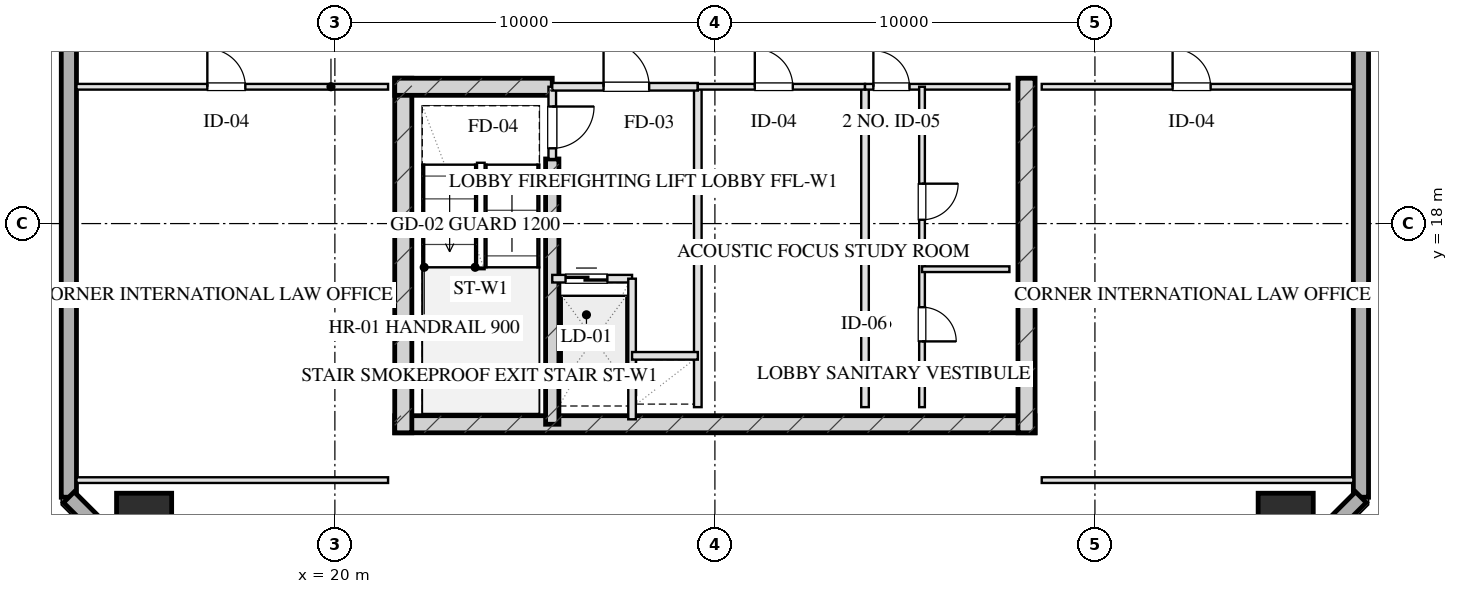
"""IFC4 building model, lengths in metres.
Left out: names, types, materials, properties, quantities, classifications, styles, units other than length and angle.
Written with IfcOpenShell. Run it as: python <this file> out.ifc"""

import sys

from ifc_helpers import new_model, si_unit, direction, frame, frame_2d, origin, origin_2d, place, context, subcontext, project, spatial, rectangle, hollow_rectangle, extrude, element, fill, save


model = new_model("IFC4")
c1 = context("Model", 3, precision=1e-05, world=origin(), true_north=direction((0.0, 1.0)))
c2 = subcontext(c1, "Body", "Model", "MODEL_VIEW")
j1 = project(units=[si_unit("LENGTHUNIT", "METRE"), si_unit("PLANEANGLEUNIT", "RADIAN")], contexts=[c1])
p1 = place(None, origin())
s1 = spatial("IfcSite", under=j1, at=p1, CompositionType="ELEMENT")
p2 = place(p1, origin())
s2 = spatial("IfcBuilding", under=s1, at=p2, CompositionType="ELEMENT")
p3 = place(p2, frame((0.0, 0.0, 188.6)))
s3 = spatial("IfcBuildingStorey", under=s2, at=p3, CompositionType="ELEMENT", Elevation=188.6)
p4 = place(p3, frame((21.575, 12.72, 0.0), z_axis=(0.0, 0.0, 1.0), x_axis=(1.0, 0.0, 0.0)))
e1 = element("IfcWall", 1, at=p4, inside=s3, PredefinedType="SHEAR", context=c2, shape_type="SweptSolid", body=[
    extrude(rectangle(XDim=16.85, YDim=0.45, at=frame_2d((8.425, 0.0))), origin(), (0.0, 0.0, 1.0), 3.45),
])
for number, where, z_axis, x_axis in (
    (2, (21.8, 21.825, 0.0), (0.0, 0.0, 1.0), (0.0, -1.0, 0.0)),
    (3, (38.2, 21.825, 0.0), (0.0, 0.0, 1.0), (0.0, -1.0, 0.0)),
):
    element("IfcWall", number, at=place(p3, frame(where, z_axis=z_axis, x_axis=x_axis)), inside=s3, PredefinedType="SHEAR", context=c2, shape_type="SweptSolid", body=[
        extrude(rectangle(XDim=9.33, YDim=0.45, at=frame_2d((4.665, 0.0))), origin(), (0.0, 0.0, 1.0), 3.45),
    ])
p5 = place(p3, frame((25.72, 19.7, 0.0), z_axis=(0.0, 0.0, 1.0), x_axis=(0.0, -1.0, 0.0)))
e4 = element("IfcWall", 4, at=p5, inside=s3, PredefinedType="SHEAR", context=c2, shape_type="SweptSolid", body=[
    extrude(rectangle(XDim=6.98, YDim=0.35, at=frame_2d((3.49, 0.0))), origin(), (0.0, 0.0, 1.0), 3.45),
])
p6 = place(p3, frame((21.575, 21.6, 0.0), z_axis=(0.0, 0.0, 1.0), x_axis=(1.0, 0.0, 0.0)))
e5 = element("IfcWall", 5, at=p6, inside=s3, PredefinedType="SHEAR", context=c2, shape_type="SweptSolid", body=[
    extrude(rectangle(XDim=4.145, YDim=0.45, at=frame_2d((2.073, 0.0))), origin(), (0.0, 0.0, 1.0), 3.45),
])
for number, where, z_axis, x_axis in (
    (6, (14.98, 10.18, 0.0), (0.0, 0.0, 1.0), (1.0, 0.0, 0.0)),
    (7, (45.02, 10.18, 0.0), (0.0, 0.0, 1.0), (1.0, 0.0, 0.0)),
):
    element("IfcColumn", number, at=place(p3, frame(where, z_axis=z_axis, x_axis=x_axis)), inside=s3, PredefinedType="COLUMN", context=c2, shape_type="SweptSolid", body=[
        extrude(hollow_rectangle(XDim=1.45, YDim=1.45, WallThickness=0.05, at=origin_2d()), origin(), (0.0, 0.0, 1.0), 3.451),
    ])
p7 = place(p3, frame((13.0, 10.8, 0.0), z_axis=(0.0, 0.0, 1.0), x_axis=(0.0, 1.0, 0.0)))
e8 = element("IfcWall", 8, at=p7, inside=s3, PredefinedType="SOLIDWALL", context=c2, shape_type="SweptSolid", body=[
    extrude(rectangle(XDim=46.4, YDim=0.4, at=frame_2d((23.2, 0.0))), origin(), (0.0, 0.0, 1.0), 2.61),
])
p8 = place(p7, frame((24.75, 0.0, 0.75)))
e9 = element("IfcOpeningElement", 9, at=p8, cuts=e8, PredefinedType="OPENING", context=c2, shape_type="SweptSolid", body=[
    extrude(rectangle(XDim=2.1, YDim=1.46, at=frame_2d((1.05, 0.73))), frame((0.0, 0.21, 0.0), z_axis=(0.0, -1.0, 0.0), x_axis=(1.0, 0.0, 0.0)), (0.0, 0.0, 1.0), 0.42),
])
p9 = place(p7, frame((28.55, 0.0, 0.75)))
e10 = element("IfcOpeningElement", 10, at=p9, cuts=e8, PredefinedType="OPENING", context=c2, shape_type="SweptSolid", body=[
    extrude(rectangle(XDim=2.1, YDim=1.46, at=frame_2d((1.05, 0.73))), frame((0.0, 0.21, 0.0), z_axis=(0.0, -1.0, 0.0), x_axis=(1.0, 0.0, 0.0)), (0.0, 0.0, 1.0), 0.42),
])
p10 = place(p7, frame((19.55, 0.0, 0.0)))
e11 = element("IfcOpeningElement", 11, at=p10, cuts=e8, PredefinedType="OPENING", context=c2, shape_type="SweptSolid", body=[
    extrude(rectangle(XDim=1.1, YDim=2.15, at=frame_2d((0.55, 1.075))), frame((0.0, 0.21, 0.0), z_axis=(0.0, -1.0, 0.0), x_axis=(1.0, 0.0, 0.0)), (0.0, 0.0, 1.0), 0.42),
])
p11 = place(p3, frame((47.0, 57.2, 0.0), z_axis=(0.0, 0.0, 1.0), x_axis=(0.0, -1.0, 0.0)))
e12 = element("IfcWall", 12, at=p11, inside=s3, PredefinedType="SOLIDWALL", context=c2, shape_type="SweptSolid", body=[
    extrude(rectangle(XDim=46.4, YDim=0.4, at=frame_2d((23.2, 0.0))), origin(), (0.0, 0.0, 1.0), 2.61),
])
p12 = place(p11, frame((19.55, 0.0, 0.75)))
e13 = element("IfcOpeningElement", 13, at=p12, cuts=e12, PredefinedType="OPENING", context=c2, shape_type="SweptSolid", body=[
    extrude(rectangle(XDim=2.1, YDim=1.46, at=frame_2d((1.05, 0.73))), frame((0.0, 0.21, 0.0), z_axis=(0.0, -1.0, 0.0), x_axis=(1.0, 0.0, 0.0)), (0.0, 0.0, 1.0), 0.42),
])
p13 = place(p11, frame((15.75, 0.0, 0.75)))
e14 = element("IfcOpeningElement", 14, at=p13, cuts=e12, PredefinedType="OPENING", context=c2, shape_type="SweptSolid", body=[
    extrude(rectangle(XDim=2.1, YDim=1.46, at=frame_2d((1.05, 0.73))), frame((0.0, 0.21, 0.0), z_axis=(0.0, -1.0, 0.0), x_axis=(1.0, 0.0, 0.0)), (0.0, 0.0, 1.0), 0.42),
])
p14 = place(p11, frame((27.05, 0.0, 0.0)))
e15 = element("IfcOpeningElement", 15, at=p14, cuts=e12, PredefinedType="OPENING", context=c2, shape_type="SweptSolid", body=[
    extrude(rectangle(XDim=1.1, YDim=2.15, at=frame_2d((0.55, 1.075))), frame((0.0, 0.21, 0.0), z_axis=(0.0, -1.0, 0.0), x_axis=(1.0, 0.0, 0.0)), (0.0, 0.0, 1.0), 0.42),
])
for number, where, z_axis, x_axis in (
    (16, (47.0, 10.8, 0.0), (0.0, 0.0, 1.0), (-0.707, -0.707, 0.0)),
    (17, (15.6, 8.2, 0.0), (0.0, 0.0, 1.0), (-0.707, 0.707, 0.0)),
):
    element("IfcWall", number, at=place(p3, frame(where, z_axis=z_axis, x_axis=x_axis)), inside=s3, PredefinedType="SOLIDWALL", context=c2, shape_type="SweptSolid", body=[
        extrude(rectangle(XDim=3.677, YDim=0.4, at=frame_2d((1.838, 0.0))), origin(), (0.0, 0.0, 1.0), 2.61),
    ])
p15 = place(p3, frame((25.72, 21.6, 0.0), z_axis=(0.0, 0.0, 1.0), x_axis=(0.0, -1.0, 0.0)))
e18 = element("IfcWall", 18, at=p15, inside=s3, PredefinedType="PARTITIONING", context=c2, shape_type="SweptSolid", body=[
    extrude(rectangle(XDim=1.9, YDim=0.2, at=frame_2d((0.95, 0.0))), origin(), (0.0, 0.0, 1.0), 3.175),
])
p16 = place(p15, frame((0.52, 0.0, 0.0)))
e19 = element("IfcOpeningElement", 19, at=p16, cuts=e18, PredefinedType="OPENING", context=c2, shape_type="SweptSolid", body=[
    extrude(rectangle(XDim=1.1, YDim=2.05, at=frame_2d((0.55, 1.025))), frame((0.0, 0.11, 0.0), z_axis=(0.0, -1.0, 0.0), x_axis=(1.0, 0.0, 0.0)), (0.0, 0.0, 1.0), 0.22),
])
p17 = place(p3, frame((29.55, 21.6, 0.0), z_axis=(0.0, 0.0, 1.0), x_axis=(0.0, -1.0, 0.0)))
e20 = element("IfcWall", 20, at=p17, inside=s3, PredefinedType="PARTITIONING", context=c2, shape_type="SweptSolid", body=[
    extrude(rectangle(XDim=8.43, YDim=0.2, at=frame_2d((4.215, 0.0))), origin(), (0.0, 0.0, 1.0), 3.175),
])
p18 = place(p3, frame((25.72, 21.6, 0.0), z_axis=(0.0, 0.0, 1.0), x_axis=(1.0, 0.0, 0.0)))
e21 = element("IfcWall", 21, at=p18, inside=s3, PredefinedType="PARTITIONING", context=c2, shape_type="SweptSolid", body=[
    extrude(rectangle(XDim=3.83, YDim=0.2, at=frame_2d((1.915, 0.0))), origin(), (0.0, 0.0, 1.0), 3.175),
])
p19 = place(p18, frame((1.35, 0.0, 0.0)))
e22 = element("IfcOpeningElement", 22, at=p19, cuts=e21, PredefinedType="OPENING", context=c2, shape_type="SweptSolid", body=[
    extrude(rectangle(XDim=1.2, YDim=2.05, at=frame_2d((0.6, 1.025))), frame((0.0, 0.11, 0.0), z_axis=(0.0, -1.0, 0.0), x_axis=(1.0, 0.0, 0.0)), (0.0, 0.0, 1.0), 0.22),
])
p20 = place(p3, frame((25.72, 16.55, 0.0), z_axis=(0.0, 0.0, 1.0), x_axis=(1.0, 0.0, 0.0)))
e23 = element("IfcWall", 23, at=p20, inside=s3, PredefinedType="PARTITIONING", context=c2, shape_type="SweptSolid", body=[
    extrude(rectangle(XDim=2.1, YDim=0.2, at=frame_2d((1.05, 0.0))), origin(), (0.0, 0.0, 1.0), 3.175),
])
p21 = place(p20, frame((0.35, 0.0, 0.0)))
e24 = element("IfcOpeningElement", 24, at=p21, cuts=e23, PredefinedType="OPENING", context=c2, shape_type="SweptSolid", body=[
    extrude(rectangle(XDim=1.1, YDim=2.05, at=frame_2d((0.55, 1.025))), frame((0.0, 0.11, 0.0), z_axis=(0.0, -1.0, 0.0), x_axis=(1.0, 0.0, 0.0)), (0.0, 0.0, 1.0), 0.22),
])
p22 = place(p3, frame((27.82, 16.55, 0.0), z_axis=(0.0, 0.0, 1.0), x_axis=(0.0, -1.0, 0.0)))
e25 = element("IfcWall", 25, at=p22, inside=s3, PredefinedType="PARTITIONING", context=c2, shape_type="SweptSolid", body=[
    extrude(rectangle(XDim=3.7, YDim=0.2, at=frame_2d((1.85, 0.0))), origin(), (0.0, 0.0, 1.0), 3.175),
])
p23 = place(p3, frame((27.82, 14.52, 0.0), z_axis=(0.0, 0.0, 1.0), x_axis=(1.0, 0.0, 0.0)))
e26 = element("IfcWall", 26, at=p23, inside=s3, PredefinedType="PARTITIONING", context=c2, shape_type="SweptSolid", body=[
    extrude(rectangle(XDim=1.73, YDim=0.2, at=frame_2d((0.865, 0.0))), origin(), (0.0, 0.0, 1.0), 3.175),
])
p24 = place(p3, frame((33.95, 21.6, 0.0), z_axis=(0.0, 0.0, 1.0), x_axis=(0.0, -1.0, 0.0)))
e27 = element("IfcWall", 27, at=p24, inside=s3, PredefinedType="PARTITIONING", context=c2, shape_type="SweptSolid", body=[
    extrude(rectangle(XDim=8.43, YDim=0.2, at=frame_2d((4.215, 0.0))), origin(), (0.0, 0.0, 1.0), 3.175),
])
p25 = place(p3, frame((29.55, 21.6, 0.0), z_axis=(0.0, 0.0, 1.0), x_axis=(1.0, 0.0, 0.0)))
e28 = element("IfcWall", 28, at=p25, inside=s3, PredefinedType="PARTITIONING", context=c2, shape_type="SweptSolid", body=[
    extrude(rectangle(XDim=4.4, YDim=0.15, at=frame_2d((2.2, 0.0))), origin(), (0.0, 0.0, 1.0), 3.175),
])
p26 = place(p25, frame((1.5, 0.0, 0.0)))
e29 = element("IfcOpeningElement", 29, at=p26, cuts=e28, PredefinedType="OPENING", context=c2, shape_type="SweptSolid", body=[
    extrude(rectangle(XDim=1.0, YDim=2.05, at=frame_2d((0.5, 1.025))), frame((0.0, 0.085, 0.0), z_axis=(0.0, -1.0, 0.0), x_axis=(1.0, 0.0, 0.0)), (0.0, 0.0, 1.0), 0.17),
])
p27 = place(p3, frame((29.55, 17.3, 0.0), z_axis=(0.0, 0.0, 1.0), x_axis=(1.0, 0.0, 0.0)))
e30 = element("IfcWall", 30, at=p27, inside=s3, PredefinedType="PARTITIONING", context=c2, shape_type="SweptSolid", body=[
    extrude(rectangle(XDim=4.4, YDim=0.15, at=frame_2d((2.2, 0.0))), origin(), (0.0, 0.0, 1.0), 3.175),
])
p28 = place(p3, frame((33.95, 21.6, 0.0), z_axis=(0.0, 0.0, 1.0), x_axis=(1.0, 0.0, 0.0)))
e31 = element("IfcWall", 31, at=p28, inside=s3, PredefinedType="PARTITIONING", context=c2, shape_type="SweptSolid", body=[
    extrude(rectangle(XDim=3.8, YDim=0.15, at=frame_2d((1.9, 0.0))), origin(), (0.0, 0.0, 1.0), 3.175),
])
p29 = place(p28, frame((0.22, 0.0, 0.0)))
e32 = element("IfcOpeningElement", 32, at=p29, cuts=e31, PredefinedType="OPENING", context=c2, shape_type="SweptSolid", body=[
    extrude(rectangle(XDim=0.95, YDim=2.05, at=frame_2d((0.475, 1.025))), frame((0.0, 0.085, 0.0), z_axis=(0.0, -1.0, 0.0), x_axis=(1.0, 0.0, 0.0)), (0.0, 0.0, 1.0), 0.17),
])
p30 = place(p3, frame((35.45, 21.6, 0.0), z_axis=(0.0, 0.0, 1.0), x_axis=(0.0, -1.0, 0.0)))
e33 = element("IfcWall", 33, at=p30, inside=s3, PredefinedType="PARTITIONING", context=c2, shape_type="SweptSolid", body=[
    extrude(rectangle(XDim=8.43, YDim=0.15, at=frame_2d((4.215, 0.0))), origin(), (0.0, 0.0, 1.0), 2.765),
])
p31 = place(p30, frame((2.55, 0.0, 0.0)))
e34 = element("IfcOpeningElement", 34, at=p31, cuts=e33, PredefinedType="OPENING", context=c2, shape_type="SweptSolid", body=[
    extrude(rectangle(XDim=0.95, YDim=2.05, at=frame_2d((0.475, 1.025))), frame((0.0, 0.085, 0.0), z_axis=(0.0, -1.0, 0.0), x_axis=(1.0, 0.0, 0.0)), (0.0, 0.0, 1.0), 0.17),
])
p32 = place(p30, frame((5.8, 0.0, 0.0)))
e35 = element("IfcOpeningElement", 35, at=p32, cuts=e33, PredefinedType="OPENING", context=c2, shape_type="SweptSolid", body=[
    extrude(rectangle(XDim=0.9, YDim=2.05, at=frame_2d((0.45, 1.025))), frame((0.0, 0.085, 0.0), z_axis=(0.0, -1.0, 0.0), x_axis=(1.0, 0.0, 0.0)), (0.0, 0.0, 1.0), 0.17),
])
p33 = place(p3, frame((35.45, 16.8, 0.0), z_axis=(0.0, 0.0, 1.0), x_axis=(1.0, 0.0, 0.0)))
e36 = element("IfcWall", 36, at=p33, inside=s3, PredefinedType="PARTITIONING", context=c2, shape_type="SweptSolid", body=[
    extrude(rectangle(XDim=2.3, YDim=0.15, at=frame_2d((1.15, 0.0))), origin(), (0.0, 0.0, 1.0), 3.175),
])
p34 = place(p3, frame((13.2, 11.25, 0.0), z_axis=(0.0, 0.0, 1.0), x_axis=(1.0, 0.0, 0.0)))
e37 = element("IfcWall", 37, at=p34, inside=s3, PredefinedType="PARTITIONING", context=c2, shape_type="SweptSolid", body=[
    extrude(rectangle(XDim=8.2, YDim=0.15, at=frame_2d((4.1, 0.0))), origin(), (0.0, 0.0, 1.0), 3.175),
])
p35 = place(p3, frame((13.2, 21.6, 0.0), z_axis=(0.0, 0.0, 1.0), x_axis=(1.0, 0.0, 0.0)))
e38 = element("IfcWall", 38, at=p35, inside=s3, PredefinedType="PARTITIONING", context=c2, shape_type="SweptSolid", body=[
    extrude(rectangle(XDim=8.2, YDim=0.15, at=frame_2d((4.1, 0.0))), origin(), (0.0, 0.0, 1.0), 3.175),
])
p36 = place(p35, frame((3.444, 0.0, 0.0)))
e39 = element("IfcOpeningElement", 39, at=p36, cuts=e38, PredefinedType="OPENING", context=c2, shape_type="SweptSolid", body=[
    extrude(rectangle(XDim=1.0, YDim=2.05, at=frame_2d((0.5, 1.025))), frame((0.0, 0.085, 0.0), z_axis=(0.0, -1.0, 0.0), x_axis=(1.0, 0.0, 0.0)), (0.0, 0.0, 1.0), 0.17),
])
p37 = place(p3, frame((38.6, 11.25, 0.0), z_axis=(0.0, 0.0, 1.0), x_axis=(1.0, 0.0, 0.0)))
e40 = element("IfcWall", 40, at=p37, inside=s3, PredefinedType="PARTITIONING", context=c2, shape_type="SweptSolid", body=[
    extrude(rectangle(XDim=8.2, YDim=0.15, at=frame_2d((4.1, 0.0))), origin(), (0.0, 0.0, 1.0), 3.175),
])
p38 = place(p3, frame((38.6, 21.6, 0.0), z_axis=(0.0, 0.0, 1.0), x_axis=(1.0, 0.0, 0.0)))
e41 = element("IfcWall", 41, at=p38, inside=s3, PredefinedType="PARTITIONING", context=c2, shape_type="SweptSolid", body=[
    extrude(rectangle(XDim=8.2, YDim=0.15, at=frame_2d((4.1, 0.0))), origin(), (0.0, 0.0, 1.0), 3.175),
])
p39 = place(p38, frame((3.444, 0.0, 0.0)))
e42 = element("IfcOpeningElement", 42, at=p39, cuts=e41, PredefinedType="OPENING", context=c2, shape_type="SweptSolid", body=[
    extrude(rectangle(XDim=1.0, YDim=2.05, at=frame_2d((0.5, 1.025))), frame((0.0, 0.085, 0.0), z_axis=(0.0, -1.0, 0.0), x_axis=(1.0, 0.0, 0.0)), (0.0, 0.0, 1.0), 0.17),
])
p40 = place(p16, origin())
e43 = element("IfcDoor", 43, at=p40, inside=s3, OperationType="SINGLE_SWING_LEFT", PredefinedType="DOOR", context=c2, shape_type="SweptSolid", body=[
    extrude(rectangle(XDim=1.1, YDim=2.05, at=frame_2d((0.55, 1.025))), frame((0.0, 0.025, 0.0), z_axis=(0.0, -1.0, 0.0), x_axis=(1.0, 0.0, 0.0)), (0.0, 0.0, 1.0), 0.05),
])
fill(e19, e43)
p41 = place(p19, origin())
e44 = element("IfcDoor", 44, at=p41, inside=s3, OperationType="SINGLE_SWING_LEFT", PredefinedType="DOOR", context=c2, shape_type="SweptSolid", body=[
    extrude(rectangle(XDim=1.2, YDim=2.05, at=frame_2d((0.6, 1.025))), frame((0.0, 0.025, 0.0), z_axis=(0.0, -1.0, 0.0), x_axis=(1.0, 0.0, 0.0)), (0.0, 0.0, 1.0), 0.05),
])
fill(e22, e44)
p42 = place(p21, origin())
e45 = element("IfcDoor", 45, at=p42, inside=s3, OperationType="DOUBLE_DOOR_SLIDING", PredefinedType="DOOR", context=c2, shape_type="SweptSolid", body=[
    extrude(rectangle(XDim=1.1, YDim=2.05, at=frame_2d((0.55, 1.025))), frame((0.0, 0.025, 0.0), z_axis=(0.0, -1.0, 0.0), x_axis=(1.0, 0.0, 0.0)), (0.0, 0.0, 1.0), 0.05),
])
fill(e24, e45)
p43 = place(p26, origin())
e46 = element("IfcDoor", 46, at=p43, inside=s3, OperationType="SINGLE_SWING_LEFT", PredefinedType="DOOR", context=c2, shape_type="SweptSolid", body=[
    extrude(rectangle(XDim=1.0, YDim=2.05, at=frame_2d((0.5, 1.025))), frame((0.0, 0.025, 0.0), z_axis=(0.0, -1.0, 0.0), x_axis=(1.0, 0.0, 0.0)), (0.0, 0.0, 1.0), 0.05),
])
fill(e29, e46)
p44 = place(p29, origin())
e47 = element("IfcDoor", 47, at=p44, inside=s3, OperationType="SINGLE_SWING_LEFT", PredefinedType="DOOR", context=c2, shape_type="SweptSolid", body=[
    extrude(rectangle(XDim=0.95, YDim=2.05, at=frame_2d((0.475, 1.025))), frame((0.0, 0.025, 0.0), z_axis=(0.0, -1.0, 0.0), x_axis=(1.0, 0.0, 0.0)), (0.0, 0.0, 1.0), 0.05),
])
fill(e32, e47)
p45 = place(p31, origin())
e48 = element("IfcDoor", 48, at=p45, inside=s3, OperationType="SINGLE_SWING_LEFT", PredefinedType="DOOR", context=c2, shape_type="SweptSolid", body=[
    extrude(rectangle(XDim=0.95, YDim=2.05, at=frame_2d((0.475, 1.025))), frame((0.0, 0.025, 0.0), z_axis=(0.0, -1.0, 0.0), x_axis=(1.0, 0.0, 0.0)), (0.0, 0.0, 1.0), 0.05),
])
fill(e34, e48)
p46 = place(p32, origin())
e49 = element("IfcDoor", 49, at=p46, inside=s3, OperationType="SINGLE_SWING_RIGHT", PredefinedType="DOOR", context=c2, shape_type="SweptSolid", body=[
    extrude(rectangle(XDim=0.9, YDim=2.05, at=frame_2d((0.45, 1.025))), frame((0.0, 0.025, 0.0), z_axis=(0.0, -1.0, 0.0), x_axis=(1.0, 0.0, 0.0)), (0.0, 0.0, 1.0), 0.05),
])
fill(e35, e49)
p47 = place(p36, origin())
e50 = element("IfcDoor", 50, at=p47, inside=s3, OperationType="SINGLE_SWING_LEFT", PredefinedType="DOOR", context=c2, shape_type="SweptSolid", body=[
    extrude(rectangle(XDim=1.0, YDim=2.05, at=frame_2d((0.5, 1.025))), frame((0.0, 0.025, 0.0), z_axis=(0.0, -1.0, 0.0), x_axis=(1.0, 0.0, 0.0)), (0.0, 0.0, 1.0), 0.05),
])
fill(e39, e50)
p48 = place(p39, origin())
e51 = element("IfcDoor", 51, at=p48, inside=s3, OperationType="SINGLE_SWING_LEFT", PredefinedType="DOOR", context=c2, shape_type="SweptSolid", body=[
    extrude(rectangle(XDim=1.0, YDim=2.05, at=frame_2d((0.5, 1.025))), frame((0.0, 0.025, 0.0), z_axis=(0.0, -1.0, 0.0), x_axis=(1.0, 0.0, 0.0)), (0.0, 0.0, 1.0), 0.05),
])
fill(e42, e51)
save(model, sys.argv[1])
